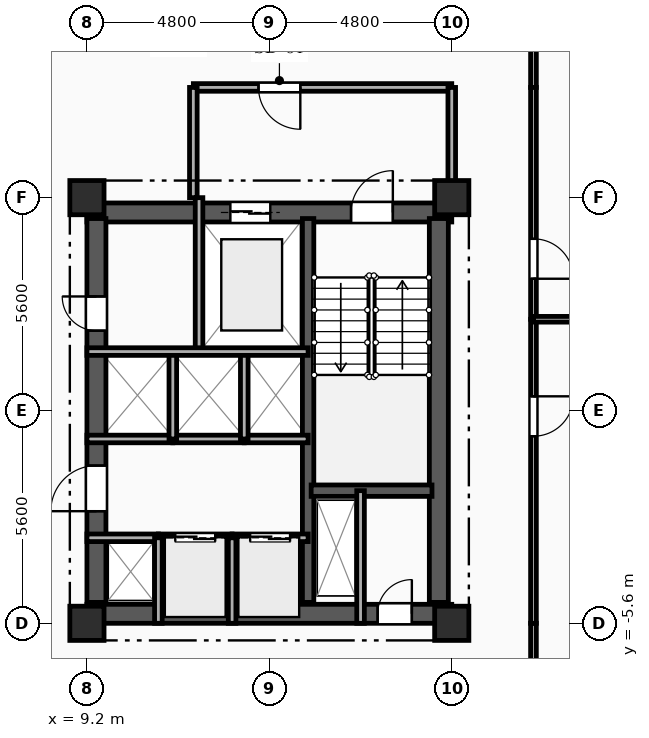
"""IFC4 building model, lengths in metres.
Left out: names, types, materials, properties, quantities, classifications, styles, units other than length and angle.
Written with IfcOpenShell. Run it as: python <this file> out.ifc"""

import sys

from ifc_helpers import new_model, si_unit, direction, frame, frame_2d, origin, origin_2d, place, context, subcontext, project, spatial, rectangle, extrude, element, fill, save


model = new_model("IFC4")
c1 = context("Model", 3, precision=1e-05, world=origin(), true_north=direction((0.0, 1.0)))
c2 = subcontext(c1, "Body", "Model", "MODEL_VIEW")
j1 = project(units=[si_unit("LENGTHUNIT", "METRE"), si_unit("PLANEANGLEUNIT", "RADIAN")], contexts=[c1])
p1 = place(None, origin())
s1 = spatial("IfcSite", under=j1, at=p1, CompositionType="ELEMENT")
p2 = place(p1, origin())
s2 = spatial("IfcBuilding", under=s1, at=p2, CompositionType="ELEMENT")
p3 = place(p2, frame((0.0, 0.0, 167.85)))
s3 = spatial("IfcBuildingStorey", under=s2, at=p3, CompositionType="ELEMENT", Elevation=167.85)
for number, where, z_axis, x_axis in (
    (1, (9.2, -5.6, 0.0), (0.0, 0.0, 1.0), (1.0, 0.0, 0.0)),
    (2, (9.2, 5.6, 0.0), (0.0, 0.0, 1.0), (1.0, 0.0, 0.0)),
    (3, (18.8, -5.6, 0.0), (0.0, 0.0, 1.0), (1.0, 0.0, 0.0)),
    (4, (18.8, 5.6, 0.0), (0.0, 0.0, 1.0), (1.0, 0.0, 0.0)),
):
    element("IfcColumn", number, at=place(p3, frame(where, z_axis=z_axis, x_axis=x_axis)), inside=s3, PredefinedType="COLUMN", context=c2, shape_type="SweptSolid", body=[
        extrude(rectangle(XDim=0.9, YDim=0.9, at=origin_2d()), origin(), (0.0, 0.0, 1.0), 3.35),
    ])
p4 = place(p3, frame((9.2, 5.21, 0.0), z_axis=(0.0, 0.0, 1.0), x_axis=(1.0, 0.0, 0.0)))
e5 = element("IfcWall", 5, at=p4, inside=s3, PredefinedType="SHEAR", context=c2, shape_type="SweptSolid", body=[
    extrude(rectangle(XDim=9.6, YDim=0.5, at=frame_2d((4.8, 0.0))), origin(), (0.0, 0.0, 1.0), 3.04),
])
p5 = place(p4, frame((6.95, 0.0, 0.0)))
e6 = element("IfcOpeningElement", 6, at=p5, cuts=e5, PredefinedType="OPENING", context=c2, shape_type="SweptSolid", body=[
    extrude(rectangle(XDim=1.1, YDim=2.15, at=frame_2d((0.55, 1.075))), frame((0.0, 0.26, 0.0), z_axis=(0.0, -1.0, 0.0), x_axis=(1.0, 0.0, 0.0)), (0.0, 0.0, 1.0), 0.52),
])
p6 = place(p4, frame((3.775, 0.0, 0.0)))
e7 = element("IfcOpeningElement", 7, at=p6, cuts=e5, PredefinedType="OPENING", context=c2, shape_type="SweptSolid", body=[
    extrude(rectangle(XDim=1.05, YDim=2.1, at=frame_2d((0.525, 1.05))), frame((0.0, 0.26, 0.0), z_axis=(0.0, -1.0, 0.0), x_axis=(1.0, 0.0, 0.0)), (0.0, 0.0, 1.0), 0.52),
])
p7 = place(p3, frame((9.2, -5.35, 0.0), z_axis=(0.0, 0.0, 1.0), x_axis=(1.0, 0.0, 0.0)))
e8 = element("IfcWall", 8, at=p7, inside=s3, PredefinedType="SHEAR", context=c2, shape_type="SweptSolid", body=[
    extrude(rectangle(XDim=9.6, YDim=0.5, at=frame_2d((4.8, 0.0))), origin(), (0.0, 0.0, 1.0), 3.04),
])
p8 = place(p7, frame((7.65, 0.0, 0.0)))
e9 = element("IfcOpeningElement", 9, at=p8, cuts=e8, PredefinedType="OPENING", context=c2, shape_type="SweptSolid", body=[
    extrude(rectangle(XDim=0.9, YDim=2.1, at=frame_2d((0.45, 1.05))), frame((0.0, 0.26, 0.0), z_axis=(0.0, -1.0, 0.0), x_axis=(1.0, 0.0, 0.0)), (0.0, 0.0, 1.0), 0.52),
])
p9 = place(p3, frame((9.45, -5.05, 0.0), z_axis=(0.0, 0.0, 1.0), x_axis=(0.0, 1.0, 0.0)))
e10 = element("IfcWall", 10, at=p9, inside=s3, PredefinedType="SHEAR", context=c2, shape_type="SweptSolid", body=[
    extrude(rectangle(XDim=10.1, YDim=0.5, at=frame_2d((5.05, 0.0))), origin(), (0.0, 0.0, 1.0), 3.04),
])
p10 = place(p9, frame((7.15, 0.0, 0.0)))
e11 = element("IfcOpeningElement", 11, at=p10, cuts=e10, PredefinedType="OPENING", context=c2, shape_type="SweptSolid", body=[
    extrude(rectangle(XDim=0.9, YDim=2.1, at=frame_2d((0.45, 1.05))), frame((0.0, 0.26, 0.0), z_axis=(0.0, -1.0, 0.0), x_axis=(1.0, 0.0, 0.0)), (0.0, 0.0, 1.0), 0.52),
])
p11 = place(p9, frame((2.4, 0.0, 0.0)))
e12 = element("IfcOpeningElement", 12, at=p11, cuts=e10, PredefinedType="OPENING", context=c2, shape_type="SweptSolid", body=[
    extrude(rectangle(XDim=1.2, YDim=2.15, at=frame_2d((0.6, 1.075))), frame((0.0, 0.26, 0.0), z_axis=(0.0, -1.0, 0.0), x_axis=(1.0, 0.0, 0.0)), (0.0, 0.0, 1.0), 0.52),
])
p12 = place(p3, frame((18.46, -5.05, 0.0), z_axis=(0.0, 0.0, 1.0), x_axis=(0.0, 1.0, 0.0)))
e13 = element("IfcWall", 13, at=p12, inside=s3, PredefinedType="SHEAR", context=c2, shape_type="SweptSolid", body=[
    extrude(rectangle(XDim=10.1, YDim=0.5, at=frame_2d((5.05, 0.0))), origin(), (0.0, 0.0, 1.0), 3.04),
])
p13 = place(p3, frame((15.02, -5.05, 0.0), z_axis=(0.0, 0.0, 1.0), x_axis=(0.0, 1.0, 0.0)))
e14 = element("IfcWall", 14, at=p13, inside=s3, PredefinedType="SHEAR", context=c2, shape_type="SweptSolid", body=[
    extrude(rectangle(XDim=10.1, YDim=0.3, at=frame_2d((5.05, 0.0))), origin(), (0.0, 0.0, 1.0), 3.04),
])
p14 = place(p3, frame((15.1, -2.11, 0.0), z_axis=(0.0, 0.0, 1.0), x_axis=(1.0, 0.0, 0.0)))
e15 = element("IfcWall", 15, at=p14, inside=s3, PredefinedType="SHEAR", context=c2, shape_type="SweptSolid", body=[
    extrude(rectangle(XDim=3.18, YDim=0.3, at=frame_2d((1.59, 0.0))), origin(), (0.0, 0.0, 1.0), 3.04),
])
p15 = place(p3, frame((16.4, -2.11, 0.0), z_axis=(0.0, 0.0, 1.0), x_axis=(0.0, -1.0, 0.0)))
e16 = element("IfcWall", 16, at=p15, inside=s3, PredefinedType="PARTITIONING", context=c2, shape_type="SweptSolid", body=[
    extrude(rectangle(XDim=3.49, YDim=0.2, at=frame_2d((1.745, 0.0))), origin(), (0.0, 0.0, 1.0), 3.04),
])
p16 = place(p3, frame((12.15, 5.6, 0.0), z_axis=(0.0, 0.0, 1.0), x_axis=(0.0, -1.0, 0.0)))
e17 = element("IfcWall", 17, at=p16, inside=s3, PredefinedType="PARTITIONING", context=c2, shape_type="SweptSolid", body=[
    extrude(rectangle(XDim=4.05, YDim=0.2, at=frame_2d((2.025, 0.0))), origin(), (0.0, 0.0, 1.0), 3.04),
])
p17 = place(p3, frame((18.8, 8.5, 0.0), z_axis=(0.0, 0.0, 1.0), x_axis=(-1.0, 0.0, 0.0)))
e18 = element("IfcWall", 18, at=p17, inside=s3, PredefinedType="PARTITIONING", context=c2, shape_type="SweptSolid", body=[
    extrude(rectangle(XDim=6.8, YDim=0.2, at=frame_2d((3.4, 0.0))), origin(), (0.0, 0.0, 1.0), 3.04),
])
p18 = place(p17, frame((3.985, 0.0, 0.0)))
e19 = element("IfcOpeningElement", 19, at=p18, cuts=e18, PredefinedType="OPENING", context=c2, shape_type="SweptSolid", body=[
    extrude(rectangle(XDim=1.1, YDim=2.15, at=frame_2d((0.55, 1.075))), frame((0.0, 0.11, 0.0), z_axis=(0.0, -1.0, 0.0), x_axis=(1.0, 0.0, 0.0)), (0.0, 0.0, 1.0), 0.22),
])
p19 = place(p3, frame((18.8, 5.6, 0.0), z_axis=(0.0, 0.0, 1.0), x_axis=(0.0, 1.0, 0.0)))
e20 = element("IfcWall", 20, at=p19, inside=s3, PredefinedType="PARTITIONING", context=c2, shape_type="SweptSolid", body=[
    extrude(rectangle(XDim=2.9, YDim=0.2, at=frame_2d((1.45, 0.0))), origin(), (0.0, 0.0, 1.0), 2.525),
])
p20 = place(p3, frame((12.0, 8.5, 0.0), z_axis=(0.0, 0.0, 1.0), x_axis=(0.0, -1.0, 0.0)))
e21 = element("IfcWall", 21, at=p20, inside=s3, PredefinedType="PARTITIONING", context=c2, shape_type="SweptSolid", body=[
    extrude(rectangle(XDim=2.9, YDim=0.2, at=frame_2d((1.45, 0.0))), origin(), (0.0, 0.0, 1.0), 3.04),
])
p21 = place(p3, frame((9.2, -3.35, 0.0), z_axis=(0.0, 0.0, 1.0), x_axis=(1.0, 0.0, 0.0)))
e22 = element("IfcWall", 22, at=p21, inside=s3, PredefinedType="PARTITIONING", context=c2, shape_type="SweptSolid", body=[
    extrude(rectangle(XDim=1.88, YDim=0.2, at=frame_2d((0.94, 0.0))), origin(), (0.0, 0.0, 1.0), 2.755),
])
p22 = place(p3, frame((11.08, -3.35, 0.0), z_axis=(0.0, 0.0, 1.0), x_axis=(1.0, 0.0, 0.0)))
e23 = element("IfcWall", 23, at=p22, inside=s3, PredefinedType="PARTITIONING", context=c2, shape_type="SweptSolid", body=[
    extrude(rectangle(XDim=1.94, YDim=0.2, at=frame_2d((0.97, 0.0))), origin(), (0.0, 0.0, 1.0), 3.04),
])
p23 = place(p22, frame((0.445, 0.0, 0.0)))
e24 = element("IfcOpeningElement", 24, at=p23, cuts=e23, PredefinedType="OPENING", context=c2, shape_type="SweptSolid", body=[
    extrude(rectangle(XDim=1.05, YDim=2.1, at=frame_2d((0.525, 1.05))), frame((0.0, 0.11, 0.0), z_axis=(0.0, -1.0, 0.0), x_axis=(1.0, 0.0, 0.0)), (0.0, 0.0, 1.0), 0.22),
])
p24 = place(p3, frame((13.02, -3.35, 0.0), z_axis=(0.0, 0.0, 1.0), x_axis=(1.0, 0.0, 0.0)))
e25 = element("IfcWall", 25, at=p24, inside=s3, PredefinedType="PARTITIONING", context=c2, shape_type="SweptSolid", body=[
    extrude(rectangle(XDim=2.0, YDim=0.2, at=frame_2d((1.0, 0.0))), origin(), (0.0, 0.0, 1.0), 3.04),
])
p25 = place(p24, frame((0.475, 0.0, 0.0)))
e26 = element("IfcOpeningElement", 26, at=p25, cuts=e25, PredefinedType="OPENING", context=c2, shape_type="SweptSolid", body=[
    extrude(rectangle(XDim=1.05, YDim=2.1, at=frame_2d((0.525, 1.05))), frame((0.0, 0.11, 0.0), z_axis=(0.0, -1.0, 0.0), x_axis=(1.0, 0.0, 0.0)), (0.0, 0.0, 1.0), 0.22),
])
p26 = place(p3, frame((11.46, -0.75, 0.0), z_axis=(0.0, 0.0, 1.0), x_axis=(-1.0, 0.0, 0.0)))
e27 = element("IfcWall", 27, at=p26, inside=s3, PredefinedType="PARTITIONING", context=c2, shape_type="SweptSolid", body=[
    extrude(rectangle(XDim=2.26, YDim=0.2, at=frame_2d((1.13, 0.0))), origin(), (0.0, 0.0, 1.0), 3.04),
])
p27 = place(p3, frame((13.34, -0.75, 0.0), z_axis=(0.0, 0.0, 1.0), x_axis=(-1.0, 0.0, 0.0)))
e28 = element("IfcWall", 28, at=p27, inside=s3, PredefinedType="PARTITIONING", context=c2, shape_type="SweptSolid", body=[
    extrude(rectangle(XDim=1.88, YDim=0.2, at=frame_2d((0.94, 0.0))), origin(), (0.0, 0.0, 1.0), 3.04),
])
p28 = place(p3, frame((15.02, -0.75, 0.0), z_axis=(0.0, 0.0, 1.0), x_axis=(-1.0, 0.0, 0.0)))
e29 = element("IfcWall", 29, at=p28, inside=s3, PredefinedType="PARTITIONING", context=c2, shape_type="SweptSolid", body=[
    extrude(rectangle(XDim=1.68, YDim=0.2, at=frame_2d((0.84, 0.0))), origin(), (0.0, 0.0, 1.0), 3.04),
])
for number, where, z_axis, x_axis in (
    (30, (11.08, -5.6, 0.0), (0.0, 0.0, 1.0), (0.0, 1.0, 0.0)),
    (31, (13.02, -5.6, 0.0), (0.0, 0.0, 1.0), (0.0, 1.0, 0.0)),
):
    element("IfcWall", number, at=place(p3, frame(where, z_axis=z_axis, x_axis=x_axis)), inside=s3, PredefinedType="PARTITIONING", context=c2, shape_type="SweptSolid", body=[
        extrude(rectangle(XDim=2.25, YDim=0.2, at=frame_2d((1.125, 0.0))), origin(), (0.0, 0.0, 1.0), 3.04),
    ])
for number, where, z_axis, x_axis in (
    (32, (11.46, -0.75, 0.0), (0.0, 0.0, 1.0), (0.0, 1.0, 0.0)),
    (33, (13.34, -0.75, 0.0), (0.0, 0.0, 1.0), (0.0, 1.0, 0.0)),
):
    element("IfcWall", number, at=place(p3, frame(where, z_axis=z_axis, x_axis=x_axis)), inside=s3, PredefinedType="PARTITIONING", context=c2, shape_type="SweptSolid", body=[
        extrude(rectangle(XDim=2.3, YDim=0.2, at=frame_2d((1.15, 0.0))), origin(), (0.0, 0.0, 1.0), 3.04),
    ])
for number, where, z_axis, x_axis in (
    (34, (20.95, 10.65, 0.0), (0.0, 0.0, 1.0), (0.0, -1.0, 0.0)),
    (35, (20.95, -5.6, 0.0), (0.0, 0.0, 1.0), (0.0, -1.0, 0.0)),
):
    element("IfcWall", number, at=place(p3, frame(where, z_axis=z_axis, x_axis=x_axis)), inside=s3, PredefinedType="PARTITIONING", context=c2, shape_type="SweptSolid", body=[
        extrude(rectangle(XDim=2.15, YDim=0.15, at=frame_2d((1.075, 0.0))), origin(), (0.0, 0.0, 1.0), 3.04),
    ])
p29 = place(p3, frame((20.95, 2.4, 0.0), z_axis=(0.0, 0.0, 1.0), x_axis=(0.0, -1.0, 0.0)))
e36 = element("IfcWall", 36, at=p29, inside=s3, PredefinedType="PARTITIONING", context=c2, shape_type="SweptSolid", body=[
    extrude(rectangle(XDim=8.0, YDim=0.15, at=frame_2d((4.0, 0.0))), origin(), (0.0, 0.0, 1.0), 3.04),
])
p30 = place(p29, frame((2.028, 0.0, 0.0)))
e37 = element("IfcOpeningElement", 37, at=p30, cuts=e36, PredefinedType="OPENING", context=c2, shape_type="SweptSolid", body=[
    extrude(rectangle(XDim=1.05, YDim=2.15, at=frame_2d((0.525, 1.075))), frame((0.0, 0.085, 0.0), z_axis=(0.0, -1.0, 0.0), x_axis=(1.0, 0.0, 0.0)), (0.0, 0.0, 1.0), 0.17),
])
p31 = place(p3, frame((20.95, 8.5, 0.0), z_axis=(0.0, 0.0, 1.0), x_axis=(0.0, -1.0, 0.0)))
e38 = element("IfcWall", 38, at=p31, inside=s3, PredefinedType="PARTITIONING", context=c2, shape_type="SweptSolid", body=[
    extrude(rectangle(XDim=6.1, YDim=0.15, at=frame_2d((3.05, 0.0))), origin(), (0.0, 0.0, 1.0), 3.04),
])
p32 = place(p31, frame((3.984, 0.0, 0.0)))
e39 = element("IfcOpeningElement", 39, at=p32, cuts=e38, PredefinedType="OPENING", context=c2, shape_type="SweptSolid", body=[
    extrude(rectangle(XDim=1.05, YDim=2.15, at=frame_2d((0.525, 1.075))), frame((0.0, 0.085, 0.0), z_axis=(0.0, -1.0, 0.0), x_axis=(1.0, 0.0, 0.0)), (0.0, 0.0, 1.0), 0.17),
])
p33 = place(p3, frame((20.95, 2.4, 0.0), z_axis=(0.0, 0.0, 1.0), x_axis=(1.0, 0.0, 0.0)))
e40 = element("IfcWall", 40, at=p33, inside=s3, PredefinedType="PARTITIONING", context=c2, shape_type="SweptSolid", body=[
    extrude(rectangle(XDim=6.05, YDim=0.15, at=frame_2d((3.025, 0.0))), origin(), (0.0, 0.0, 1.0), 3.04),
])
p34 = place(p3, frame((9.2, 1.55, 0.0), z_axis=(0.0, 0.0, 1.0), x_axis=(1.0, 0.0, 0.0)))
e41 = element("IfcWall", 41, at=p34, inside=s3, PredefinedType="PARTITIONING", context=c2, shape_type="SweptSolid", body=[
    extrude(rectangle(XDim=5.82, YDim=0.2, at=frame_2d((2.91, 0.0))), origin(), (0.0, 0.0, 1.0), 3.04),
])
p35 = place(p5, origin())
e42 = element("IfcDoor", 42, at=p35, inside=s3, OperationType="SINGLE_SWING_RIGHT", PredefinedType="DOOR", context=c2, shape_type="SweptSolid", body=[
    extrude(rectangle(XDim=1.1, YDim=2.15, at=frame_2d((0.55, 1.075))), frame((0.0, 0.025, 0.0), z_axis=(0.0, -1.0, 0.0), x_axis=(1.0, 0.0, 0.0)), (0.0, 0.0, 1.0), 0.05),
])
fill(e6, e42)
p36 = place(p6, origin())
e43 = element("IfcDoor", 43, at=p36, inside=s3, OperationType="DOUBLE_DOOR_SLIDING", PredefinedType="DOOR", context=c2, shape_type="SweptSolid", body=[
    extrude(rectangle(XDim=1.05, YDim=2.1, at=frame_2d((0.525, 1.05))), frame((0.0, 0.025, 0.0), z_axis=(0.0, -1.0, 0.0), x_axis=(1.0, 0.0, 0.0)), (0.0, 0.0, 1.0), 0.05),
])
fill(e7, e43)
p37 = place(p8, origin())
e44 = element("IfcDoor", 44, at=p37, inside=s3, OperationType="SINGLE_SWING_RIGHT", PredefinedType="DOOR", context=c2, shape_type="SweptSolid", body=[
    extrude(rectangle(XDim=0.9, YDim=2.1, at=frame_2d((0.45, 1.05))), frame((0.0, 0.025, 0.0), z_axis=(0.0, -1.0, 0.0), x_axis=(1.0, 0.0, 0.0)), (0.0, 0.0, 1.0), 0.05),
])
fill(e9, e44)
p38 = place(p18, origin())
e45 = element("IfcDoor", 45, at=p38, inside=s3, OperationType="SINGLE_SWING_LEFT", PredefinedType="DOOR", context=c2, shape_type="SweptSolid", body=[
    extrude(rectangle(XDim=1.1, YDim=2.15, at=frame_2d((0.55, 1.075))), frame((0.0, 0.025, 0.0), z_axis=(0.0, -1.0, 0.0), x_axis=(1.0, 0.0, 0.0)), (0.0, 0.0, 1.0), 0.05),
])
fill(e19, e45)
p39 = place(p10, origin())
e46 = element("IfcDoor", 46, at=p39, inside=s3, OperationType="SINGLE_SWING_RIGHT", PredefinedType="DOOR", context=c2, shape_type="SweptSolid", body=[
    extrude(rectangle(XDim=0.9, YDim=2.1, at=frame_2d((0.45, 1.05))), frame((0.0, 0.025, 0.0), z_axis=(0.0, -1.0, 0.0), x_axis=(1.0, 0.0, 0.0)), (0.0, 0.0, 1.0), 0.05),
])
fill(e11, e46)
p40 = place(p23, origin())
e47 = element("IfcDoor", 47, at=p40, inside=s3, OperationType="DOUBLE_DOOR_SLIDING", PredefinedType="DOOR", context=c2, shape_type="SweptSolid", body=[
    extrude(rectangle(XDim=1.05, YDim=2.1, at=frame_2d((0.525, 1.05))), frame((0.0, 0.025, 0.0), z_axis=(0.0, -1.0, 0.0), x_axis=(1.0, 0.0, 0.0)), (0.0, 0.0, 1.0), 0.05),
])
fill(e24, e47)
p41 = place(p25, origin())
e48 = element("IfcDoor", 48, at=p41, inside=s3, OperationType="DOUBLE_DOOR_SLIDING", PredefinedType="DOOR", context=c2, shape_type="SweptSolid", body=[
    extrude(rectangle(XDim=1.05, YDim=2.1, at=frame_2d((0.525, 1.05))), frame((0.0, 0.025, 0.0), z_axis=(0.0, -1.0, 0.0), x_axis=(1.0, 0.0, 0.0)), (0.0, 0.0, 1.0), 0.05),
])
fill(e26, e48)
p42 = place(p11, origin())
e49 = element("IfcDoor", 49, at=p42, inside=s3, OperationType="SINGLE_SWING_LEFT", PredefinedType="DOOR", context=c2, shape_type="SweptSolid", body=[
    extrude(rectangle(XDim=1.2, YDim=2.15, at=frame_2d((0.6, 1.075))), frame((0.0, 0.025, 0.0), z_axis=(0.0, -1.0, 0.0), x_axis=(1.0, 0.0, 0.0)), (0.0, 0.0, 1.0), 0.05),
])
fill(e12, e49)
p43 = place(p30, origin())
e50 = element("IfcDoor", 50, at=p43, inside=s3, OperationType="SINGLE_SWING_LEFT", PredefinedType="DOOR", context=c2, shape_type="SweptSolid", body=[
    extrude(rectangle(XDim=1.05, YDim=2.15, at=frame_2d((0.525, 1.075))), frame((0.0, 0.025, 0.0), z_axis=(0.0, -1.0, 0.0), x_axis=(1.0, 0.0, 0.0)), (0.0, 0.0, 1.0), 0.05),
])
fill(e37, e50)
p44 = place(p32, origin())
e51 = element("IfcDoor", 51, at=p44, inside=s3, OperationType="SINGLE_SWING_RIGHT", PredefinedType="DOOR", context=c2, shape_type="SweptSolid", body=[
    extrude(rectangle(XDim=1.05, YDim=2.15, at=frame_2d((0.525, 1.075))), frame((0.0, 0.025, 0.0), z_axis=(0.0, -1.0, 0.0), x_axis=(1.0, 0.0, 0.0)), (0.0, 0.0, 1.0), 0.05),
])
fill(e39, e51)
save(model, sys.argv[1])
